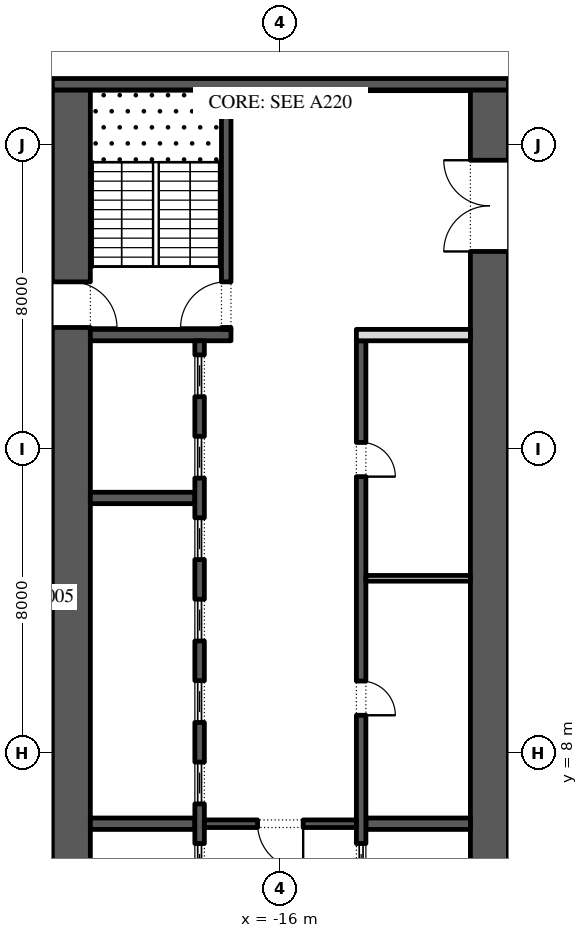
"""IFC4 building model, lengths in metres.
Left out: names, types, materials, properties, quantities, classifications, styles, units other than length and angle.
Written with IfcOpenShell. Run it as: python <this file> out.ifc"""

import sys

from ifc_helpers import new_model, si_unit, direction, frame, frame_2d, origin, place, context, subcontext, project, spatial, rectangle, extrude, element, fill, save


model = new_model("IFC4")
c1 = context("Model", 3, precision=1e-05, world=origin(), true_north=direction((0.0, 1.0)))
c2 = subcontext(c1, "Body", "Model", "MODEL_VIEW")
j1 = project(units=[si_unit("LENGTHUNIT", "METRE"), si_unit("PLANEANGLEUNIT", "RADIAN")], contexts=[c1])
p1 = place(None, origin())
s1 = spatial("IfcSite", under=j1, at=p1, CompositionType="ELEMENT")
p2 = place(p1, origin())
s2 = spatial("IfcBuilding", under=s1, at=p2, CompositionType="ELEMENT")
p3 = place(p2, frame((0.0, 0.0, 81.6)))
s3 = spatial("IfcBuildingStorey", under=s2, at=p3, CompositionType="ELEMENT", Elevation=81.6)
p4 = place(p3, frame((-21.5, -2.45, 0.0), z_axis=(0.0, 0.0, 1.0), x_axis=(0.0, 1.0, 0.0)))
e1 = element("IfcWall", 1, at=p4, inside=s3, PredefinedType="SHEAR", context=c2, shape_type="SweptSolid", body=[
    extrude(rectangle(XDim=27.9, YDim=1.0, at=frame_2d((13.95, 0.0))), origin(), (0.0, 0.0, 1.0), 4.0),
])
p5 = place(p4, frame((5.05, 0.0, 0.0)))
e2 = element("IfcOpeningElement", 2, at=p5, cuts=e1, PredefinedType="OPENING", context=c2, shape_type="SweptSolid", body=[
    extrude(rectangle(XDim=1.2, YDim=2.1, at=frame_2d((0.6, 1.05))), frame((0.0, 0.51, 0.0), z_axis=(0.0, -1.0, 0.0), x_axis=(1.0, 0.0, 0.0)), (0.0, 0.0, 1.0), 1.02),
])
p6 = place(p4, frame((21.65, 0.0, 0.0)))
e3 = element("IfcOpeningElement", 3, at=p6, cuts=e1, PredefinedType="OPENING", context=c2, shape_type="SweptSolid", body=[
    extrude(rectangle(XDim=1.2, YDim=2.1, at=frame_2d((0.6, 1.05))), frame((0.0, 0.51, 0.0), z_axis=(0.0, -1.0, 0.0), x_axis=(1.0, 0.0, 0.0)), (0.0, 0.0, 1.0), 1.02),
])
p7 = place(p3, frame((-10.5, -2.45, 0.0), z_axis=(0.0, 0.0, 1.0), x_axis=(0.0, 1.0, 0.0)))
e4 = element("IfcWall", 4, at=p7, inside=s3, PredefinedType="SHEAR", context=c2, shape_type="SweptSolid", body=[
    extrude(rectangle(XDim=27.9, YDim=1.0, at=frame_2d((13.95, 0.0))), origin(), (0.0, 0.0, 1.0), 4.0),
])
p8 = place(p7, frame((23.65, 0.0, 0.0)))
e5 = element("IfcOpeningElement", 5, at=p8, cuts=e4, PredefinedType="OPENING", context=c2, shape_type="SweptSolid", body=[
    extrude(rectangle(XDim=2.4, YDim=2.1, at=frame_2d((1.2, 1.05))), frame((0.0, 0.51, 0.0), z_axis=(0.0, -1.0, 0.0), x_axis=(1.0, 0.0, 0.0)), (0.0, 0.0, 1.0), 1.02),
])
p9 = place(p7, frame((1.387, 0.0, 0.0)))
e6 = element("IfcOpeningElement", 6, at=p9, cuts=e4, PredefinedType="OPENING", context=c2, shape_type="SweptSolid", body=[
    extrude(rectangle(XDim=0.9, YDim=2.1, at=frame_2d((0.45, 1.05))), frame((0.0, 0.51, 0.0), z_axis=(0.0, -1.0, 0.0), x_axis=(1.0, 0.0, 0.0)), (0.0, 0.0, 1.0), 1.02),
])
p10 = place(p7, frame((4.613, 0.0, 0.0)))
e7 = element("IfcOpeningElement", 7, at=p10, cuts=e4, PredefinedType="OPENING", context=c2, shape_type="SweptSolid", body=[
    extrude(rectangle(XDim=0.9, YDim=2.1, at=frame_2d((0.45, 1.05))), frame((0.0, 0.51, 0.0), z_axis=(0.0, -1.0, 0.0), x_axis=(1.0, 0.0, 0.0)), (0.0, 0.0, 1.0), 1.02),
])
p11 = place(p3, frame((-22.0, 25.6, 0.0), z_axis=(0.0, 0.0, 1.0), x_axis=(1.0, 0.0, 0.0)))
e8 = element("IfcWall", 8, at=p11, inside=s3, PredefinedType="SHEAR", context=c2, shape_type="SweptSolid", body=[
    extrude(rectangle(XDim=12.0, YDim=0.3, at=frame_2d((6.0, 0.0))), origin(), (0.0, 0.0, 1.0), 4.0),
])
p12 = place(p3, frame((-21.0, 19.0, 0.0), z_axis=(0.0, 0.0, 1.0), x_axis=(1.0, 0.0, 0.0)))
e9 = element("IfcWall", 9, at=p12, inside=s3, PredefinedType="SHEAR", context=c2, shape_type="SweptSolid", body=[
    extrude(rectangle(XDim=3.7, YDim=0.3, at=frame_2d((1.85, 0.0))), origin(), (0.0, 0.0, 1.0), 4.0),
])
p13 = place(p3, frame((-17.425, 19.15, 0.0), z_axis=(0.0, 0.0, 1.0), x_axis=(0.0, 1.0, 0.0)))
e10 = element("IfcWall", 10, at=p13, inside=s3, PredefinedType="SHEAR", context=c2, shape_type="SweptSolid", body=[
    extrude(rectangle(XDim=6.3, YDim=0.25, at=frame_2d((3.15, 0.0))), origin(), (0.0, 0.0, 1.0), 4.0),
])
p14 = place(p13, frame((0.05, 0.0, 0.0)))
e11 = element("IfcOpeningElement", 11, at=p14, cuts=e10, PredefinedType="OPENING", context=c2, shape_type="SweptSolid", body=[
    extrude(rectangle(XDim=1.2, YDim=2.1, at=frame_2d((0.6, 1.05))), frame((0.0, 0.135, 0.0), z_axis=(0.0, -1.0, 0.0), x_axis=(1.0, 0.0, 0.0)), (0.0, 0.0, 1.0), 0.27),
])
for number, where, z_axis, x_axis in (
    (12, (-21.0, 6.143, 0.0), (0.0, 0.0, 1.0), (1.0, 0.0, 0.0)),
    (13, (-21.0, 14.714, 0.0), (0.0, 0.0, 1.0), (1.0, 0.0, 0.0)),
):
    element("IfcWall", number, at=place(p3, frame(where, z_axis=z_axis, x_axis=x_axis)), inside=s3, PredefinedType="SHEAR", context=c2, shape_type="SweptSolid", body=[
        extrude(rectangle(XDim=2.75, YDim=0.3, at=frame_2d((1.375, 0.0))), origin(), (0.0, 0.0, 1.0), 4.0),
    ])
p15 = place(p3, frame((-18.125, 4.15, 0.0), z_axis=(0.0, 0.0, 1.0), x_axis=(0.0, 1.0, 0.0)))
e14 = element("IfcWall", 14, at=p15, inside=s3, PredefinedType="SHEAR", context=c2, shape_type="SweptSolid", body=[
    extrude(rectangle(XDim=14.7, YDim=0.25, at=frame_2d((7.35, 0.0))), origin(), (0.0, 0.0, 1.0), 4.0),
])
p16 = place(p15, frame((0.371, 0.0, 0.0)))
e15 = element("IfcOpeningElement", 15, at=p16, cuts=e14, PredefinedType="OPENING", context=c2, shape_type="SweptSolid", body=[
    extrude(rectangle(XDim=1.1, YDim=2.1, at=frame_2d((0.55, 1.05))), frame((0.0, 0.135, 0.0), z_axis=(0.0, -1.0, 0.0), x_axis=(1.0, 0.0, 0.0)), (0.0, 0.0, 1.0), 0.27),
])
p17 = place(p15, frame((2.514, 0.0, 0.0)))
e16 = element("IfcOpeningElement", 16, at=p17, cuts=e14, PredefinedType="OPENING", context=c2, shape_type="SweptSolid", body=[
    extrude(rectangle(XDim=1.1, YDim=2.1, at=frame_2d((0.55, 1.05))), frame((0.0, 0.135, 0.0), z_axis=(0.0, -1.0, 0.0), x_axis=(1.0, 0.0, 0.0)), (0.0, 0.0, 1.0), 0.27),
])
p18 = place(p15, frame((4.657, 0.0, 0.0)))
e17 = element("IfcOpeningElement", 17, at=p18, cuts=e14, PredefinedType="OPENING", context=c2, shape_type="SweptSolid", body=[
    extrude(rectangle(XDim=1.1, YDim=2.1, at=frame_2d((0.55, 1.05))), frame((0.0, 0.135, 0.0), z_axis=(0.0, -1.0, 0.0), x_axis=(1.0, 0.0, 0.0)), (0.0, 0.0, 1.0), 0.27),
])
p19 = place(p15, frame((6.8, 0.0, 0.0)))
e18 = element("IfcOpeningElement", 18, at=p19, cuts=e14, PredefinedType="OPENING", context=c2, shape_type="SweptSolid", body=[
    extrude(rectangle(XDim=1.1, YDim=2.1, at=frame_2d((0.55, 1.05))), frame((0.0, 0.135, 0.0), z_axis=(0.0, -1.0, 0.0), x_axis=(1.0, 0.0, 0.0)), (0.0, 0.0, 1.0), 0.27),
])
p20 = place(p15, frame((8.943, 0.0, 0.0)))
e19 = element("IfcOpeningElement", 19, at=p20, cuts=e14, PredefinedType="OPENING", context=c2, shape_type="SweptSolid", body=[
    extrude(rectangle(XDim=1.1, YDim=2.1, at=frame_2d((0.55, 1.05))), frame((0.0, 0.135, 0.0), z_axis=(0.0, -1.0, 0.0), x_axis=(1.0, 0.0, 0.0)), (0.0, 0.0, 1.0), 0.27),
])
p21 = place(p15, frame((11.086, 0.0, 0.0)))
e20 = element("IfcOpeningElement", 20, at=p21, cuts=e14, PredefinedType="OPENING", context=c2, shape_type="SweptSolid", body=[
    extrude(rectangle(XDim=1.1, YDim=2.1, at=frame_2d((0.55, 1.05))), frame((0.0, 0.135, 0.0), z_axis=(0.0, -1.0, 0.0), x_axis=(1.0, 0.0, 0.0)), (0.0, 0.0, 1.0), 0.27),
])
p22 = place(p15, frame((13.229, 0.0, 0.0)))
e21 = element("IfcOpeningElement", 21, at=p22, cuts=e14, PredefinedType="OPENING", context=c2, shape_type="SweptSolid", body=[
    extrude(rectangle(XDim=1.1, YDim=2.1, at=frame_2d((0.55, 1.05))), frame((0.0, 0.135, 0.0), z_axis=(0.0, -1.0, 0.0), x_axis=(1.0, 0.0, 0.0)), (0.0, 0.0, 1.0), 0.27),
])
p23 = place(p3, frame((-13.75, 6.143, 0.0), z_axis=(0.0, 0.0, 1.0), x_axis=(1.0, 0.0, 0.0)))
e22 = element("IfcWall", 22, at=p23, inside=s3, PredefinedType="SHEAR", context=c2, shape_type="SweptSolid", body=[
    extrude(rectangle(XDim=2.75, YDim=0.3, at=frame_2d((1.375, 0.0))), origin(), (0.0, 0.0, 1.0), 4.0),
])
p24 = place(p3, frame((-13.875, -2.45, 0.0), z_axis=(0.0, 0.0, 1.0), x_axis=(0.0, 1.0, 0.0)))
e23 = element("IfcWall", 23, at=p24, inside=s3, PredefinedType="SHEAR", context=c2, shape_type="SweptSolid", body=[
    extrude(rectangle(XDim=21.3, YDim=0.25, at=frame_2d((10.65, 0.0))), origin(), (0.0, 0.0, 1.0), 4.0),
])
p25 = place(p24, frame((11.446, 0.0, 0.0)))
e24 = element("IfcOpeningElement", 24, at=p25, cuts=e23, PredefinedType="OPENING", context=c2, shape_type="SweptSolid", body=[
    extrude(rectangle(XDim=0.9, YDim=2.1, at=frame_2d((0.45, 1.05))), frame((0.0, 0.135, 0.0), z_axis=(0.0, -1.0, 0.0), x_axis=(1.0, 0.0, 0.0)), (0.0, 0.0, 1.0), 0.27),
])
p26 = place(p24, frame((17.725, 0.0, 0.0)))
e25 = element("IfcOpeningElement", 25, at=p26, cuts=e23, PredefinedType="OPENING", context=c2, shape_type="SweptSolid", body=[
    extrude(rectangle(XDim=0.9, YDim=2.1, at=frame_2d((0.45, 1.05))), frame((0.0, 0.135, 0.0), z_axis=(0.0, -1.0, 0.0), x_axis=(1.0, 0.0, 0.0)), (0.0, 0.0, 1.0), 0.27),
])
p27 = place(p24, frame((6.971, 0.0, 0.0)))
e26 = element("IfcOpeningElement", 26, at=p27, cuts=e23, PredefinedType="OPENING", context=c2, shape_type="SweptSolid", body=[
    extrude(rectangle(XDim=1.1, YDim=2.1, at=frame_2d((0.55, 1.05))), frame((0.0, 0.135, 0.0), z_axis=(0.0, -1.0, 0.0), x_axis=(1.0, 0.0, 0.0)), (0.0, 0.0, 1.0), 0.27),
])
p28 = place(p3, frame((-14.0, 19.0, 0.0), z_axis=(0.0, 0.0, 1.0), x_axis=(1.0, 0.0, 0.0)))
e27 = element("IfcWall", 27, at=p28, inside=s3, PredefinedType="PARTITIONING", context=c2, shape_type="SweptSolid", body=[
    extrude(rectangle(XDim=3.0, YDim=0.3, at=frame_2d((1.5, 0.0))), origin(), (0.0, 0.0, 1.0), 4.0),
])
p29 = place(p3, frame((-13.75, 12.6, 0.0), z_axis=(0.0, 0.0, 1.0), x_axis=(1.0, 0.0, 0.0)))
e28 = element("IfcWall", 28, at=p29, inside=s3, PredefinedType="PARTITIONING", context=c2, shape_type="SweptSolid", body=[
    extrude(rectangle(XDim=2.75, YDim=0.15, at=frame_2d((1.375, 0.0))), origin(), (0.0, 0.0, 1.0), 4.0),
])
p30 = place(p3, frame((-18.0, 6.143, 0.0), z_axis=(0.0, 0.0, 1.0), x_axis=(1.0, 0.0, 0.0)))
e29 = element("IfcWall", 29, at=p30, inside=s3, PredefinedType="SHEAR", context=c2, shape_type="SweptSolid", body=[
    extrude(rectangle(XDim=4.0, YDim=0.2, at=frame_2d((2.0, 0.0))), origin(), (0.0, 0.0, 1.0), 4.0),
])
p31 = place(p30, frame((1.4, 0.0, 0.0)))
e30 = element("IfcOpeningElement", 30, at=p31, cuts=e29, PredefinedType="OPENING", context=c2, shape_type="SweptSolid", body=[
    extrude(rectangle(XDim=1.2, YDim=2.1, at=frame_2d((0.6, 1.05))), frame((0.0, 0.11, 0.0), z_axis=(0.0, -1.0, 0.0), x_axis=(1.0, 0.0, 0.0)), (0.0, 0.0, 1.0), 0.22),
])
p32 = place(p16, origin())
e31 = element("IfcDoor", 31, at=p32, inside=s3, OperationType="SLIDING_TO_LEFT", PredefinedType="DOOR", context=c2, shape_type="SweptSolid", body=[
    extrude(rectangle(XDim=1.1, YDim=2.1, at=frame_2d((0.55, 1.05))), frame((0.0, 0.025, 0.0), z_axis=(0.0, -1.0, 0.0), x_axis=(1.0, 0.0, 0.0)), (0.0, 0.0, 1.0), 0.05),
])
fill(e15, e31)
p33 = place(p17, origin())
e32 = element("IfcDoor", 32, at=p33, inside=s3, OperationType="SLIDING_TO_LEFT", PredefinedType="DOOR", context=c2, shape_type="SweptSolid", body=[
    extrude(rectangle(XDim=1.1, YDim=2.1, at=frame_2d((0.55, 1.05))), frame((0.0, 0.025, 0.0), z_axis=(0.0, -1.0, 0.0), x_axis=(1.0, 0.0, 0.0)), (0.0, 0.0, 1.0), 0.05),
])
fill(e16, e32)
p34 = place(p18, origin())
e33 = element("IfcDoor", 33, at=p34, inside=s3, OperationType="SLIDING_TO_LEFT", PredefinedType="DOOR", context=c2, shape_type="SweptSolid", body=[
    extrude(rectangle(XDim=1.1, YDim=2.1, at=frame_2d((0.55, 1.05))), frame((0.0, 0.025, 0.0), z_axis=(0.0, -1.0, 0.0), x_axis=(1.0, 0.0, 0.0)), (0.0, 0.0, 1.0), 0.05),
])
fill(e17, e33)
p35 = place(p19, origin())
e34 = element("IfcDoor", 34, at=p35, inside=s3, OperationType="SLIDING_TO_LEFT", PredefinedType="DOOR", context=c2, shape_type="SweptSolid", body=[
    extrude(rectangle(XDim=1.1, YDim=2.1, at=frame_2d((0.55, 1.05))), frame((0.0, 0.025, 0.0), z_axis=(0.0, -1.0, 0.0), x_axis=(1.0, 0.0, 0.0)), (0.0, 0.0, 1.0), 0.05),
])
fill(e18, e34)
p36 = place(p20, origin())
e35 = element("IfcDoor", 35, at=p36, inside=s3, OperationType="SLIDING_TO_LEFT", PredefinedType="DOOR", context=c2, shape_type="SweptSolid", body=[
    extrude(rectangle(XDim=1.1, YDim=2.1, at=frame_2d((0.55, 1.05))), frame((0.0, 0.025, 0.0), z_axis=(0.0, -1.0, 0.0), x_axis=(1.0, 0.0, 0.0)), (0.0, 0.0, 1.0), 0.05),
])
fill(e19, e35)
p37 = place(p21, origin())
e36 = element("IfcDoor", 36, at=p37, inside=s3, OperationType="SLIDING_TO_LEFT", PredefinedType="DOOR", context=c2, shape_type="SweptSolid", body=[
    extrude(rectangle(XDim=1.1, YDim=2.1, at=frame_2d((0.55, 1.05))), frame((0.0, 0.025, 0.0), z_axis=(0.0, -1.0, 0.0), x_axis=(1.0, 0.0, 0.0)), (0.0, 0.0, 1.0), 0.05),
])
fill(e20, e36)
p38 = place(p22, origin())
e37 = element("IfcDoor", 37, at=p38, inside=s3, OperationType="SLIDING_TO_LEFT", PredefinedType="DOOR", context=c2, shape_type="SweptSolid", body=[
    extrude(rectangle(XDim=1.1, YDim=2.1, at=frame_2d((0.55, 1.05))), frame((0.0, 0.025, 0.0), z_axis=(0.0, -1.0, 0.0), x_axis=(1.0, 0.0, 0.0)), (0.0, 0.0, 1.0), 0.05),
])
fill(e21, e37)
p39 = place(p25, frame((0.9, -0.2, 0.0), z_axis=(0.0, 0.0, 1.0), x_axis=(-1.0, 0.0, 0.0)))
e38 = element("IfcDoor", 38, at=p39, inside=s3, OperationType="SINGLE_SWING_LEFT", PredefinedType="DOOR", context=c2, shape_type="SweptSolid", body=[
    extrude(rectangle(XDim=0.9, YDim=2.1, at=frame_2d((0.45, 1.05))), frame((0.0, -0.075, 0.0), z_axis=(0.0, -1.0, 0.0), x_axis=(1.0, 0.0, 0.0)), (0.0, 0.0, 1.0), 0.05),
])
fill(e24, e38)
p40 = place(p26, frame((0.9, -0.2, 0.0), z_axis=(0.0, 0.0, 1.0), x_axis=(-1.0, 0.0, 0.0)))
e39 = element("IfcDoor", 39, at=p40, inside=s3, OperationType="SINGLE_SWING_LEFT", PredefinedType="DOOR", context=c2, shape_type="SweptSolid", body=[
    extrude(rectangle(XDim=0.9, YDim=2.1, at=frame_2d((0.45, 1.05))), frame((0.0, -0.075, 0.0), z_axis=(0.0, -1.0, 0.0), x_axis=(1.0, 0.0, 0.0)), (0.0, 0.0, 1.0), 0.05),
])
fill(e25, e39)
p41 = place(p27, origin())
e40 = element("IfcDoor", 40, at=p41, inside=s3, OperationType="SLIDING_TO_LEFT", PredefinedType="DOOR", context=c2, shape_type="SweptSolid", body=[
    extrude(rectangle(XDim=1.1, YDim=2.1, at=frame_2d((0.55, 1.05))), frame((0.0, 0.025, 0.0), z_axis=(0.0, -1.0, 0.0), x_axis=(1.0, 0.0, 0.0)), (0.0, 0.0, 1.0), 0.05),
])
fill(e26, e40)
p42 = place(p31, frame((1.2, 0.0, 0.0), z_axis=(0.0, 0.0, 1.0), x_axis=(-1.0, 0.0, 0.0)))
e41 = element("IfcDoor", 41, at=p42, inside=s3, OperationType="SINGLE_SWING_RIGHT", PredefinedType="DOOR", context=c2, shape_type="SweptSolid", body=[
    extrude(rectangle(XDim=1.2, YDim=2.1, at=frame_2d((0.6, 1.05))), frame((0.0, 0.025, 0.0), z_axis=(0.0, -1.0, 0.0), x_axis=(1.0, 0.0, 0.0)), (0.0, 0.0, 1.0), 0.05),
])
fill(e30, e41)
p43 = place(p8, origin())
e42 = element("IfcDoor", 42, at=p43, inside=s3, OperationType="DOUBLE_DOOR_SINGLE_SWING", PredefinedType="DOOR", context=c2, shape_type="SweptSolid", body=[
    extrude(rectangle(XDim=2.4, YDim=2.1, at=frame_2d((1.2, 1.05))), frame((0.0, 0.025, 0.0), z_axis=(0.0, -1.0, 0.0), x_axis=(1.0, 0.0, 0.0)), (0.0, 0.0, 1.0), 0.05),
])
fill(e5, e42)
p44 = place(p14, origin())
e43 = element("IfcDoor", 43, at=p44, inside=s3, OperationType="SINGLE_SWING_RIGHT", PredefinedType="DOOR", context=c2, shape_type="SweptSolid", body=[
    extrude(rectangle(XDim=1.2, YDim=2.1, at=frame_2d((0.6, 1.05))), frame((0.0, 0.025, 0.0), z_axis=(0.0, -1.0, 0.0), x_axis=(1.0, 0.0, 0.0)), (0.0, 0.0, 1.0), 0.05),
])
fill(e11, e43)
p45 = place(p6, frame((1.2, 0.0, 0.0), z_axis=(0.0, 0.0, 1.0), x_axis=(-1.0, 0.0, 0.0)))
e44 = element("IfcDoor", 44, at=p45, inside=s3, OperationType="SINGLE_SWING_LEFT", PredefinedType="DOOR", context=c2, shape_type="SweptSolid", body=[
    extrude(rectangle(XDim=1.2, YDim=2.1, at=frame_2d((0.6, 1.05))), frame((0.0, 0.025, 0.0), z_axis=(0.0, -1.0, 0.0), x_axis=(1.0, 0.0, 0.0)), (0.0, 0.0, 1.0), 0.05),
])
fill(e3, e44)
save(model, sys.argv[1])
